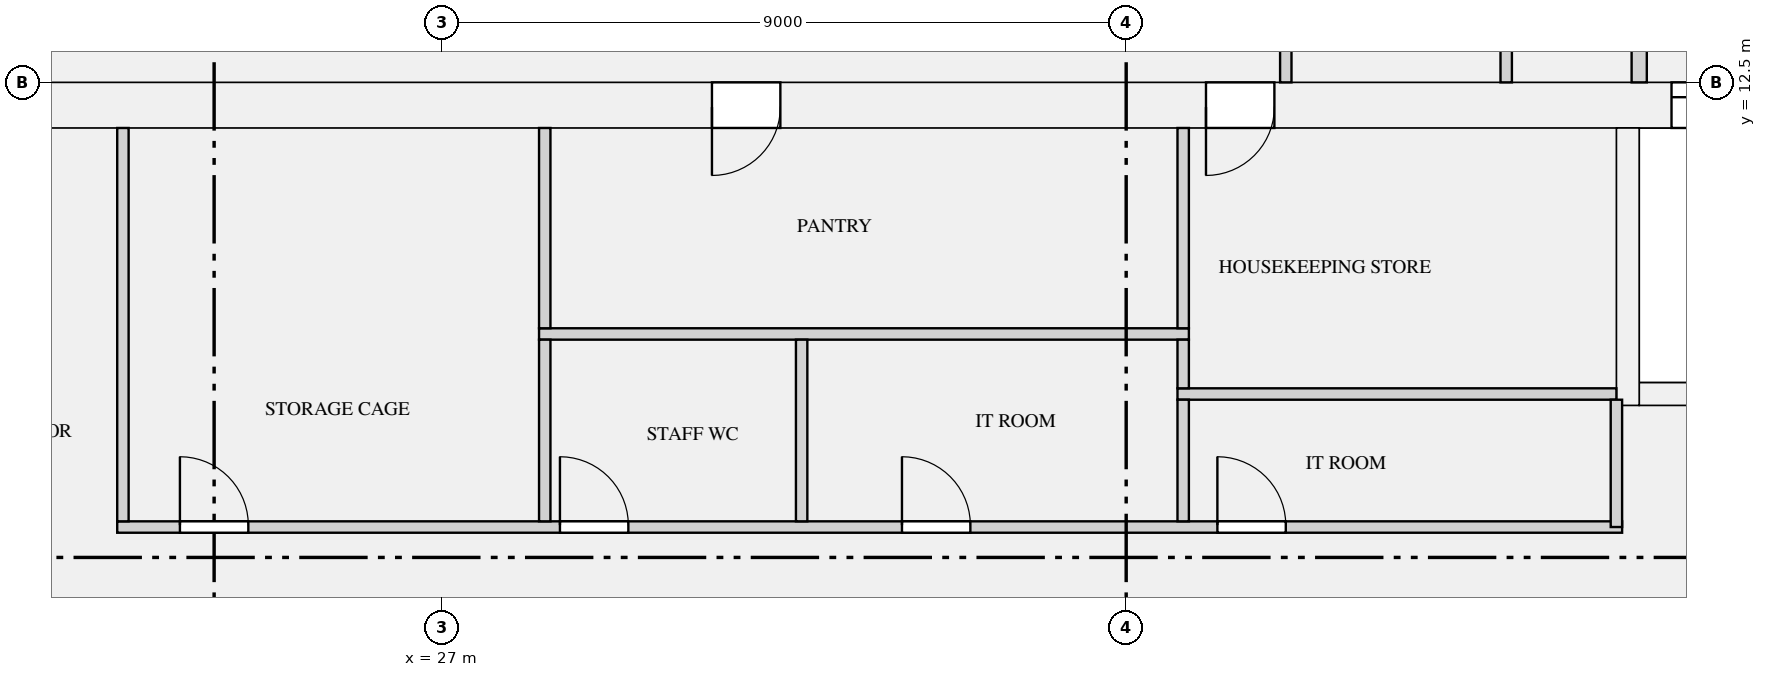
"""IFC4 building model, lengths in metres.
Left out: names, types, materials, properties, quantities, classifications, styles, units other than length and angle.
Written with IfcOpenShell. Run it as: python <this file> out.ifc"""

import sys

from ifc_helpers import new_model, si_unit, direction, frame, frame_2d, origin, place, context, subcontext, project, spatial, rectangle, extrude, element, fill, save


model = new_model("IFC4")
c1 = context("Model", 3, precision=1e-05, world=origin(), true_north=direction((0.0, 1.0)))
c2 = subcontext(c1, "Body", "Model", "MODEL_VIEW")
j1 = project(units=[si_unit("LENGTHUNIT", "METRE"), si_unit("PLANEANGLEUNIT", "RADIAN")], contexts=[c1])
p1 = place(None, origin())
s1 = spatial("IfcSite", under=j1, at=p1, CompositionType="ELEMENT")
p2 = place(p1, origin())
s2 = spatial("IfcBuilding", under=s1, at=p2, CompositionType="ELEMENT")
p3 = place(p2, frame((0.0, 0.0, 223.2)))
s3 = spatial("IfcBuildingStorey", under=s2, at=p3, CompositionType="ELEMENT", Elevation=223.2)
p4 = place(p3, frame((18.6, 12.2, 0.0), z_axis=(0.0, 0.0, 1.0), x_axis=(1.0, 0.0, 0.0)))
e1 = element("IfcWall", 1, at=p4, inside=s3, PredefinedType="SHEAR", context=c2, shape_type="SweptSolid", body=[
    extrude(rectangle(XDim=34.8, YDim=0.6, at=frame_2d((17.4, 0.0))), origin(), (0.0, 0.0, 1.0), 3.15),
])
p5 = place(p4, frame((24.575, 0.0, 0.0)))
e2 = element("IfcOpeningElement", 2, at=p5, cuts=e1, PredefinedType="OPENING", context=c2, shape_type="SweptSolid", body=[
    extrude(rectangle(XDim=1.1, YDim=2.1, at=frame_2d((0.55, 1.05))), frame((0.0, 0.31, 0.0), z_axis=(0.0, -1.0, 0.0), x_axis=(1.0, 0.0, 0.0)), (0.0, 0.0, 1.0), 0.62),
])
p6 = place(p4, frame((26.825, 0.0, 0.0)))
e3 = element("IfcOpeningElement", 3, at=p6, cuts=e1, PredefinedType="OPENING", context=c2, shape_type="SweptSolid", body=[
    extrude(rectangle(XDim=1.1, YDim=2.1, at=frame_2d((0.55, 1.05))), frame((0.0, 0.31, 0.0), z_axis=(0.0, -1.0, 0.0), x_axis=(1.0, 0.0, 0.0)), (0.0, 0.0, 1.0), 0.62),
])
p7 = place(p4, frame((29.075, 0.0, 0.0)))
e4 = element("IfcOpeningElement", 4, at=p7, cuts=e1, PredefinedType="OPENING", context=c2, shape_type="SweptSolid", body=[
    extrude(rectangle(XDim=1.1, YDim=2.1, at=frame_2d((0.55, 1.05))), frame((0.0, 0.31, 0.0), z_axis=(0.0, -1.0, 0.0), x_axis=(1.0, 0.0, 0.0)), (0.0, 0.0, 1.0), 0.62),
])
p8 = place(p4, frame((11.95, 0.0, 0.0)))
e5 = element("IfcOpeningElement", 5, at=p8, cuts=e1, PredefinedType="OPENING", context=c2, shape_type="SweptSolid", body=[
    extrude(rectangle(XDim=0.9, YDim=2.1, at=frame_2d((0.45, 1.05))), frame((0.0, 0.31, 0.0), z_axis=(0.0, -1.0, 0.0), x_axis=(1.0, 0.0, 0.0)), (0.0, 0.0, 1.0), 0.62),
])
p9 = place(p4, frame((18.45, 0.0, 0.0)))
e6 = element("IfcOpeningElement", 6, at=p9, cuts=e1, PredefinedType="OPENING", context=c2, shape_type="SweptSolid", body=[
    extrude(rectangle(XDim=0.9, YDim=2.1, at=frame_2d((0.45, 1.05))), frame((0.0, 0.31, 0.0), z_axis=(0.0, -1.0, 0.0), x_axis=(1.0, 0.0, 0.0)), (0.0, 0.0, 1.0), 0.62),
])
p10 = place(p4, frame((1.55, 0.0, 0.0)))
e7 = element("IfcOpeningElement", 7, at=p10, cuts=e1, PredefinedType="OPENING", context=c2, shape_type="SweptSolid", body=[
    extrude(rectangle(XDim=1.2, YDim=2.1, at=frame_2d((0.6, 1.05))), frame((0.0, 0.31, 0.0), z_axis=(0.0, -1.0, 0.0), x_axis=(1.0, 0.0, 0.0)), (0.0, 0.0, 1.0), 0.62),
])
p11 = place(p4, frame((32.05, 0.0, 0.0)))
e8 = element("IfcOpeningElement", 8, at=p11, cuts=e1, PredefinedType="OPENING", context=c2, shape_type="SweptSolid", body=[
    extrude(rectangle(XDim=1.2, YDim=2.1, at=frame_2d((0.6, 1.05))), frame((0.0, 0.31, 0.0), z_axis=(0.0, -1.0, 0.0), x_axis=(1.0, 0.0, 0.0)), (0.0, 0.0, 1.0), 0.62),
])
p12 = place(p3, frame((42.75, 8.4, 0.0), z_axis=(0.0, 0.0, 1.0), x_axis=(1.0, 0.0, 0.0)))
e9 = element("IfcWall", 9, at=p12, inside=s3, PredefinedType="SHEAR", context=c2, shape_type="SweptSolid", body=[
    extrude(rectangle(XDim=1.95, YDim=0.3, at=frame_2d((0.975, 0.0))), origin(), (0.0, 0.0, 1.0), 3.15),
])
p13 = place(p3, frame((42.6, 8.25, 0.0), z_axis=(0.0, 0.0, 1.0), x_axis=(0.0, 1.0, 0.0)))
e10 = element("IfcWall", 10, at=p13, inside=s3, PredefinedType="SHEAR", context=c2, shape_type="SweptSolid", body=[
    extrude(rectangle(XDim=3.65, YDim=0.3, at=frame_2d((1.825, 0.0))), origin(), (0.0, 0.0, 1.0), 3.15),
])
p14 = place(p3, frame((22.725, 6.65, 0.0), z_axis=(0.0, 0.0, 1.0), x_axis=(1.0, 0.0, 0.0)))
e11 = element("IfcWall", 11, at=p14, inside=s3, PredefinedType="PARTITIONING", context=c2, shape_type="SweptSolid", body=[
    extrude(rectangle(XDim=19.8, YDim=0.15, at=frame_2d((9.9, 0.0))), origin(), (0.0, 0.0, 1.0), 2.83),
])
p15 = place(p14, frame((0.825, 0.0, 0.0)))
e12 = element("IfcOpeningElement", 12, at=p15, cuts=e11, PredefinedType="OPENING", context=c2, shape_type="SweptSolid", body=[
    extrude(rectangle(XDim=0.9, YDim=2.1, at=frame_2d((0.45, 1.05))), frame((0.0, 0.085, 0.0), z_axis=(0.0, -1.0, 0.0), x_axis=(1.0, 0.0, 0.0)), (0.0, 0.0, 1.0), 0.17),
])
p16 = place(p14, frame((5.825, 0.0, 0.0)))
e13 = element("IfcOpeningElement", 13, at=p16, cuts=e11, PredefinedType="OPENING", context=c2, shape_type="SweptSolid", body=[
    extrude(rectangle(XDim=0.9, YDim=2.1, at=frame_2d((0.45, 1.05))), frame((0.0, 0.085, 0.0), z_axis=(0.0, -1.0, 0.0), x_axis=(1.0, 0.0, 0.0)), (0.0, 0.0, 1.0), 0.17),
])
p17 = place(p14, frame((10.325, 0.0, 0.0)))
e14 = element("IfcOpeningElement", 14, at=p17, cuts=e11, PredefinedType="OPENING", context=c2, shape_type="SweptSolid", body=[
    extrude(rectangle(XDim=0.9, YDim=2.1, at=frame_2d((0.45, 1.05))), frame((0.0, 0.085, 0.0), z_axis=(0.0, -1.0, 0.0), x_axis=(1.0, 0.0, 0.0)), (0.0, 0.0, 1.0), 0.17),
])
p18 = place(p14, frame((14.475, 0.0, 0.0)))
e15 = element("IfcOpeningElement", 15, at=p18, cuts=e11, PredefinedType="OPENING", context=c2, shape_type="SweptSolid", body=[
    extrude(rectangle(XDim=0.9, YDim=2.1, at=frame_2d((0.45, 1.05))), frame((0.0, 0.085, 0.0), z_axis=(0.0, -1.0, 0.0), x_axis=(1.0, 0.0, 0.0)), (0.0, 0.0, 1.0), 0.17),
])
p19 = place(p3, frame((36.675, 8.4, 0.0), z_axis=(0.0, 0.0, 1.0), x_axis=(1.0, 0.0, 0.0)))
e16 = element("IfcWall", 16, at=p19, inside=s3, PredefinedType="PARTITIONING", context=c2, shape_type="SweptSolid", body=[
    extrude(rectangle(XDim=5.775, YDim=0.15, at=frame_2d((2.887, 0.0))), origin(), (0.0, 0.0, 1.0), 2.83),
])
p20 = place(p3, frame((28.275, 9.19, 0.0), z_axis=(0.0, 0.0, 1.0), x_axis=(1.0, 0.0, 0.0)))
e17 = element("IfcWall", 17, at=p20, inside=s3, PredefinedType="PARTITIONING", context=c2, shape_type="SweptSolid", body=[
    extrude(rectangle(XDim=8.55, YDim=0.15, at=frame_2d((4.275, 0.0))), origin(), (0.0, 0.0, 1.0), 2.83),
])
p21 = place(p3, frame((42.45, 6.65, 0.0), z_axis=(0.0, 0.0, 1.0), x_axis=(0.0, 1.0, 0.0)))
e18 = element("IfcWall", 18, at=p21, inside=s3, PredefinedType="PARTITIONING", context=c2, shape_type="SweptSolid", body=[
    extrude(rectangle(XDim=1.675, YDim=0.15, at=frame_2d((0.837, 0.0))), origin(), (0.0, 0.0, 1.0), 2.83),
])
p22 = place(p3, frame((22.8, 6.725, 0.0), z_axis=(0.0, 0.0, 1.0), x_axis=(0.0, 1.0, 0.0)))
e19 = element("IfcWall", 19, at=p22, inside=s3, PredefinedType="PARTITIONING", context=c2, shape_type="SweptSolid", body=[
    extrude(rectangle(XDim=5.175, YDim=0.15, at=frame_2d((2.587, 0.0))), origin(), (0.0, 0.0, 1.0), 2.83),
])
for number, where, z_axis, x_axis in (
    (20, (28.35, 6.725, 0.0), (0.0, 0.0, 1.0), (0.0, 1.0, 0.0)),
    (21, (31.73, 6.725, 0.0), (0.0, 0.0, 1.0), (0.0, 1.0, 0.0)),
):
    element("IfcWall", number, at=place(p3, frame(where, z_axis=z_axis, x_axis=x_axis)), inside=s3, PredefinedType="PARTITIONING", context=c2, shape_type="SweptSolid", body=[
        extrude(rectangle(XDim=2.39, YDim=0.15, at=frame_2d((1.195, 0.0))), origin(), (0.0, 0.0, 1.0), 2.83),
    ])
p23 = place(p3, frame((36.75, 6.725, 0.0), z_axis=(0.0, 0.0, 1.0), x_axis=(0.0, 1.0, 0.0)))
e22 = element("IfcWall", 22, at=p23, inside=s3, PredefinedType="PARTITIONING", context=c2, shape_type="SweptSolid", body=[
    extrude(rectangle(XDim=1.6, YDim=0.15, at=frame_2d((0.8, 0.0))), origin(), (0.0, 0.0, 1.0), 2.83),
])
p24 = place(p3, frame((36.75, 8.475, 0.0), z_axis=(0.0, 0.0, 1.0), x_axis=(0.0, 1.0, 0.0)))
e23 = element("IfcWall", 23, at=p24, inside=s3, PredefinedType="PARTITIONING", context=c2, shape_type="SweptSolid", body=[
    extrude(rectangle(XDim=0.64, YDim=0.15, at=frame_2d((0.32, 0.0))), origin(), (0.0, 0.0, 1.0), 2.83),
])
for number, where, z_axis, x_axis in (
    (24, (28.35, 9.265, 0.0), (0.0, 0.0, 1.0), (0.0, 1.0, 0.0)),
    (25, (36.75, 9.265, 0.0), (0.0, 0.0, 1.0), (0.0, 1.0, 0.0)),
):
    element("IfcWall", number, at=place(p3, frame(where, z_axis=z_axis, x_axis=x_axis)), inside=s3, PredefinedType="PARTITIONING", context=c2, shape_type="SweptSolid", body=[
        extrude(rectangle(XDim=2.635, YDim=0.15, at=frame_2d((1.317, 0.0))), origin(), (0.0, 0.0, 1.0), 2.83),
    ])
for number, where, z_axis, x_axis in (
    (26, (38.1, 12.5, 0.0), (0.0, 0.0, 1.0), (0.0, 1.0, 0.0)),
    (27, (41.0, 12.5, 0.0), (0.0, 0.0, 1.0), (0.0, 1.0, 0.0)),
):
    element("IfcWall", number, at=place(p3, frame(where, z_axis=z_axis, x_axis=x_axis)), inside=s3, PredefinedType="PARTITIONING", context=c2, shape_type="SweptSolid", body=[
        extrude(rectangle(XDim=1.925, YDim=0.15, at=frame_2d((0.962, 0.0))), origin(), (0.0, 0.0, 1.0), 2.83),
    ])
p25 = place(p3, frame((42.75, 12.5, 0.0), z_axis=(0.0, 0.0, 1.0), x_axis=(0.0, 1.0, 0.0)))
e28 = element("IfcWall", 28, at=p25, inside=s3, PredefinedType="PARTITIONING", context=c2, shape_type="SweptSolid", body=[
    extrude(rectangle(XDim=3.4, YDim=0.2, at=frame_2d((1.7, 0.0))), origin(), (0.0, 0.0, 1.0), 2.83),
])
p26 = place(p25, frame((2.2, 0.0, 0.0)))
e29 = element("IfcOpeningElement", 29, at=p26, cuts=e28, PredefinedType="OPENING", context=c2, shape_type="SweptSolid", body=[
    extrude(rectangle(XDim=1.0, YDim=2.1, at=frame_2d((0.5, 1.05))), frame((0.0, 0.11, 0.0), z_axis=(0.0, -1.0, 0.0), x_axis=(1.0, 0.0, 0.0)), (0.0, 0.0, 1.0), 0.22),
])
p27 = place(p5, origin())
e30 = element("IfcDoor", 30, at=p27, inside=s3, OperationType="DOUBLE_DOOR_SLIDING", PredefinedType="DOOR", context=c2, shape_type="SweptSolid", body=[
    extrude(rectangle(XDim=1.1, YDim=2.1, at=frame_2d((0.55, 1.05))), frame((0.0, 0.025, 0.0), z_axis=(0.0, -1.0, 0.0), x_axis=(1.0, 0.0, 0.0)), (0.0, 0.0, 1.0), 0.05),
])
fill(e2, e30)
p28 = place(p15, origin())
e31 = element("IfcDoor", 31, at=p28, inside=s3, OperationType="SINGLE_SWING_LEFT", PredefinedType="DOOR", context=c2, shape_type="SweptSolid", body=[
    extrude(rectangle(XDim=0.9, YDim=2.1, at=frame_2d((0.45, 1.05))), frame((0.0, 0.025, 0.0), z_axis=(0.0, -1.0, 0.0), x_axis=(1.0, 0.0, 0.0)), (0.0, 0.0, 1.0), 0.05),
])
fill(e12, e31)
p29 = place(p16, origin())
e32 = element("IfcDoor", 32, at=p29, inside=s3, OperationType="SINGLE_SWING_LEFT", PredefinedType="DOOR", context=c2, shape_type="SweptSolid", body=[
    extrude(rectangle(XDim=0.9, YDim=2.1, at=frame_2d((0.45, 1.05))), frame((0.0, 0.025, 0.0), z_axis=(0.0, -1.0, 0.0), x_axis=(1.0, 0.0, 0.0)), (0.0, 0.0, 1.0), 0.05),
])
fill(e13, e32)
p30 = place(p17, origin())
e33 = element("IfcDoor", 33, at=p30, inside=s3, OperationType="SINGLE_SWING_LEFT", PredefinedType="DOOR", context=c2, shape_type="SweptSolid", body=[
    extrude(rectangle(XDim=0.9, YDim=2.1, at=frame_2d((0.45, 1.05))), frame((0.0, 0.025, 0.0), z_axis=(0.0, -1.0, 0.0), x_axis=(1.0, 0.0, 0.0)), (0.0, 0.0, 1.0), 0.05),
])
fill(e14, e33)
p31 = place(p8, frame((0.9, 0.0, 0.0), z_axis=(0.0, 0.0, 1.0), x_axis=(-1.0, 0.0, 0.0)))
e34 = element("IfcDoor", 34, at=p31, inside=s3, OperationType="SINGLE_SWING_RIGHT", PredefinedType="DOOR", context=c2, shape_type="SweptSolid", body=[
    extrude(rectangle(XDim=0.9, YDim=2.1, at=frame_2d((0.45, 1.05))), frame((0.0, 0.025, 0.0), z_axis=(0.0, -1.0, 0.0), x_axis=(1.0, 0.0, 0.0)), (0.0, 0.0, 1.0), 0.05),
])
fill(e5, e34)
p32 = place(p18, origin())
e35 = element("IfcDoor", 35, at=p32, inside=s3, OperationType="SINGLE_SWING_LEFT", PredefinedType="DOOR", context=c2, shape_type="SweptSolid", body=[
    extrude(rectangle(XDim=0.9, YDim=2.1, at=frame_2d((0.45, 1.05))), frame((0.0, 0.025, 0.0), z_axis=(0.0, -1.0, 0.0), x_axis=(1.0, 0.0, 0.0)), (0.0, 0.0, 1.0), 0.05),
])
fill(e15, e35)
p33 = place(p9, frame((0.9, 0.0, 0.0), z_axis=(0.0, 0.0, 1.0), x_axis=(-1.0, 0.0, 0.0)))
e36 = element("IfcDoor", 36, at=p33, inside=s3, OperationType="SINGLE_SWING_RIGHT", PredefinedType="DOOR", context=c2, shape_type="SweptSolid", body=[
    extrude(rectangle(XDim=0.9, YDim=2.1, at=frame_2d((0.45, 1.05))), frame((0.0, 0.025, 0.0), z_axis=(0.0, -1.0, 0.0), x_axis=(1.0, 0.0, 0.0)), (0.0, 0.0, 1.0), 0.05),
])
fill(e6, e36)
save(model, sys.argv[1])
